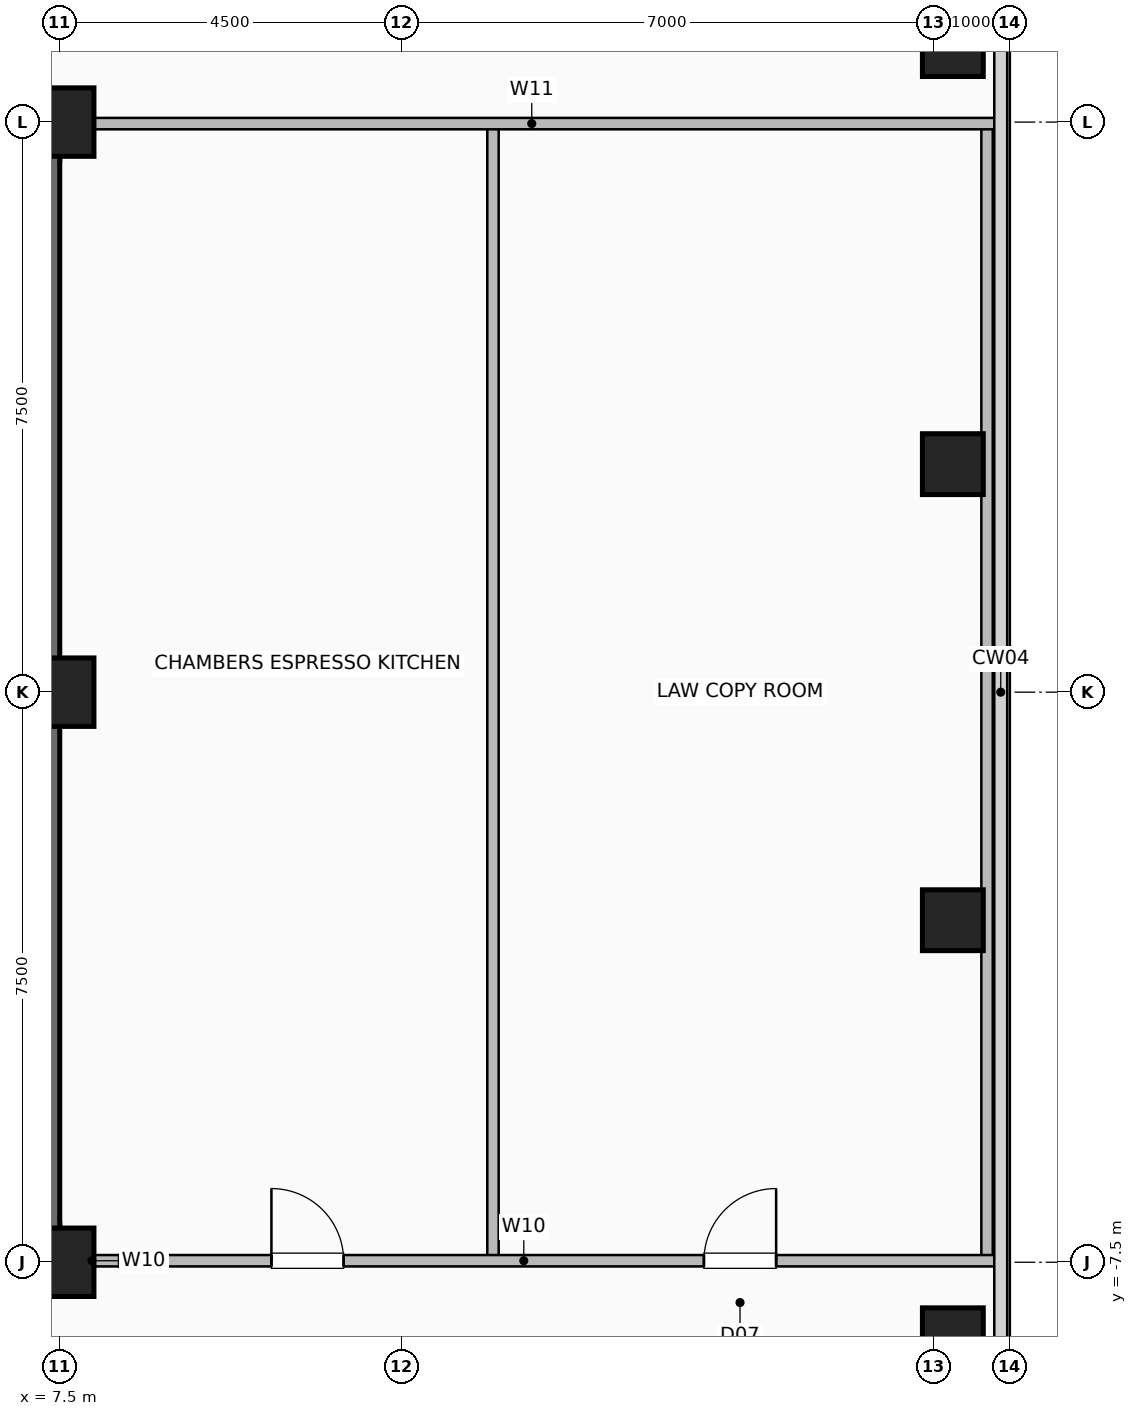
"""IFC4 building model, lengths in metres.
Left out: names, types, materials, properties, quantities, classifications, styles, units other than length and angle.
Written with IfcOpenShell. Run it as: python <this file> out.ifc"""

import sys

from ifc_helpers import new_model, si_unit, direction, frame, frame_2d, origin, origin_2d, place, context, subcontext, project, spatial, rectangle, hollow_rectangle, extrude, element, fill, save


model = new_model("IFC4")
c1 = context("Model", 3, precision=1e-05, world=origin(), true_north=direction((0.0, 1.0)))
c2 = subcontext(c1, "Body", "Model", "MODEL_VIEW")
j1 = project(units=[si_unit("LENGTHUNIT", "METRE"), si_unit("PLANEANGLEUNIT", "RADIAN")], contexts=[c1])
p1 = place(None, origin())
s1 = spatial("IfcSite", under=j1, at=p1, CompositionType="ELEMENT")
p2 = place(p1, origin())
s2 = spatial("IfcBuilding", under=s1, at=p2, CompositionType="ELEMENT")
p3 = place(p2, frame((0.0, 0.0, 177.0)))
s3 = spatial("IfcBuildingStorey", under=s2, at=p3, CompositionType="ELEMENT", Elevation=177.0)
for number, where, z_axis, x_axis in (
    (1, (7.5, -7.5, 0.0), (0.0, 0.0, 1.0), (1.0, 0.0, 0.0)),
    (2, (7.5, 0.0, 0.0), (0.0, 0.0, 1.0), (1.0, 0.0, 0.0)),
    (3, (7.5, 7.5, 0.0), (0.0, 0.0, 1.0), (1.0, 0.0, 0.0)),
):
    element("IfcColumn", number, at=place(p3, frame(where, z_axis=z_axis, x_axis=x_axis)), inside=s3, PredefinedType="COLUMN", context=c2, shape_type="SweptSolid", body=[
        extrude(hollow_rectangle(XDim=0.9, YDim=0.9, WallThickness=0.045, at=origin_2d()), origin(), (0.0, 0.0, 1.0), 3.6),
    ])
for number, where, z_axis, x_axis in (
    (4, (19.25, -8.5, 0.0), (0.0, 0.0, 1.0), (1.0, 0.0, 0.0)),
    (5, (19.25, -3.0, 0.0), (0.0, 0.0, 1.0), (1.0, 0.0, 0.0)),
    (6, (19.25, 3.0, 0.0), (0.0, 0.0, 1.0), (1.0, 0.0, 0.0)),
    (7, (19.25, 8.5, 0.0), (0.0, 0.0, 1.0), (1.0, 0.0, 0.0)),
):
    element("IfcColumn", number, at=place(p3, frame(where, z_axis=z_axis, x_axis=x_axis)), inside=s3, PredefinedType="COLUMN", context=c2, shape_type="SweptSolid", body=[
        extrude(hollow_rectangle(XDim=0.8, YDim=0.8, WallThickness=0.04, at=origin_2d()), origin(), (0.0, 0.0, 1.0), 3.6),
    ])
p4 = place(p3, frame((-7.5, -7.25, 0.0), z_axis=(0.0, 0.0, 1.0), x_axis=(1.0, 0.0, 0.0)))
e8 = element("IfcWall", 8, at=p4, inside=s3, PredefinedType="SHEAR", context=c2, shape_type="SweptSolid", body=[
    extrude(rectangle(XDim=15.0, YDim=0.5, at=frame_2d((7.5, 0.0))), origin(), (0.0, 0.0, 1.0), 3.36),
])
p5 = place(p4, frame((1.55, 0.0, 0.0)))
e9 = element("IfcOpeningElement", 9, at=p5, cuts=e8, PredefinedType="OPENING", context=c2, shape_type="SweptSolid", body=[
    extrude(rectangle(XDim=1.05, YDim=2.08, at=frame_2d((0.525, 1.04))), frame((0.0, 0.26, 0.0), z_axis=(0.0, -1.0, 0.0), x_axis=(1.0, 0.0, 0.0)), (0.0, 0.0, 1.0), 0.52),
])
p6 = place(p4, frame((12.4, 0.0, 0.0)))
e10 = element("IfcOpeningElement", 10, at=p6, cuts=e8, PredefinedType="OPENING", context=c2, shape_type="SweptSolid", body=[
    extrude(rectangle(XDim=1.05, YDim=2.08, at=frame_2d((0.525, 1.04))), frame((0.0, 0.26, 0.0), z_axis=(0.0, -1.0, 0.0), x_axis=(1.0, 0.0, 0.0)), (0.0, 0.0, 1.0), 0.52),
])
p7 = place(p4, frame((4.95, 0.0, 0.0)))
e11 = element("IfcOpeningElement", 11, at=p7, cuts=e8, PredefinedType="OPENING", context=c2, shape_type="SweptSolid", body=[
    extrude(rectangle(XDim=1.0, YDim=2.08, at=frame_2d((0.5, 1.04))), frame((0.0, 0.26, 0.0), z_axis=(0.0, -1.0, 0.0), x_axis=(1.0, 0.0, 0.0)), (0.0, 0.0, 1.0), 0.52),
])
p8 = place(p4, frame((7.05, 0.0, 0.0)))
e12 = element("IfcOpeningElement", 12, at=p8, cuts=e8, PredefinedType="OPENING", context=c2, shape_type="SweptSolid", body=[
    extrude(rectangle(XDim=1.0, YDim=2.08, at=frame_2d((0.5, 1.04))), frame((0.0, 0.26, 0.0), z_axis=(0.0, -1.0, 0.0), x_axis=(1.0, 0.0, 0.0)), (0.0, 0.0, 1.0), 0.52),
])
p9 = place(p4, frame((9.15, 0.0, 0.0)))
e13 = element("IfcOpeningElement", 13, at=p9, cuts=e8, PredefinedType="OPENING", context=c2, shape_type="SweptSolid", body=[
    extrude(rectangle(XDim=1.0, YDim=2.08, at=frame_2d((0.5, 1.04))), frame((0.0, 0.26, 0.0), z_axis=(0.0, -1.0, 0.0), x_axis=(1.0, 0.0, 0.0)), (0.0, 0.0, 1.0), 0.52),
])
for number, where, z_axis, x_axis in (
    (14, (-7.5, 7.25, 0.0), (0.0, 0.0, 1.0), (1.0, 0.0, 0.0)),
    (15, (7.25, -7.5, 0.0), (0.0, 0.0, 1.0), (0.0, 1.0, 0.0)),
):
    element("IfcWall", number, at=place(p3, frame(where, z_axis=z_axis, x_axis=x_axis)), inside=s3, PredefinedType="SHEAR", context=c2, shape_type="SweptSolid", body=[
        extrude(rectangle(XDim=15.0, YDim=0.5, at=frame_2d((7.5, 0.0))), origin(), (0.0, 0.0, 1.0), 3.36),
    ])
p10 = place(p3, frame((7.45, -7.48, 0.0), z_axis=(0.0, 0.0, 1.0), x_axis=(1.0, 0.0, 0.0)))
e16 = element("IfcWall", 16, at=p10, inside=s3, PredefinedType="PARTITIONING", context=c2, shape_type="SweptSolid", body=[
    extrude(rectangle(XDim=0.95, YDim=0.15, at=frame_2d((0.475, 0.0))), origin(), (0.0, 0.0, 1.0), 3.36),
])
for number, where, z_axis, x_axis in (
    (17, (13.2, -7.48, 0.0), (0.0, 0.0, 1.0), (0.0, 1.0, 0.0)),
    (18, (19.7, -7.48, 0.0), (0.0, 0.0, 1.0), (0.0, 1.0, 0.0)),
):
    element("IfcWall", number, at=place(p3, frame(where, z_axis=z_axis, x_axis=x_axis)), inside=s3, PredefinedType="PARTITIONING", context=c2, shape_type="SweptSolid", body=[
        extrude(rectangle(XDim=14.9, YDim=0.15, at=frame_2d((7.45, 0.0))), origin(), (0.0, 0.0, 1.0), 3.36),
    ])
p11 = place(p3, frame((8.28, -7.48, 0.0), z_axis=(0.0, 0.0, 1.0), x_axis=(1.0, 0.0, 0.0)))
e19 = element("IfcWall", 19, at=p11, inside=s3, PredefinedType="PARTITIONING", context=c2, shape_type="SweptSolid", body=[
    extrude(rectangle(XDim=11.54, YDim=0.15, at=frame_2d((5.77, 0.0))), origin(), (0.0, 0.0, 1.0), 3.36),
])
p12 = place(p11, frame((2.005, 0.0, 0.0)))
e20 = element("IfcOpeningElement", 20, at=p12, cuts=e19, PredefinedType="OPENING", context=c2, shape_type="SweptSolid", body=[
    extrude(rectangle(XDim=0.95, YDim=2.06, at=frame_2d((0.475, 1.03))), frame((0.0, 0.085, 0.0), z_axis=(0.0, -1.0, 0.0), x_axis=(1.0, 0.0, 0.0)), (0.0, 0.0, 1.0), 0.17),
])
p13 = place(p11, frame((7.695, 0.0, 0.0)))
e21 = element("IfcOpeningElement", 21, at=p13, cuts=e19, PredefinedType="OPENING", context=c2, shape_type="SweptSolid", body=[
    extrude(rectangle(XDim=0.95, YDim=2.06, at=frame_2d((0.475, 1.03))), frame((0.0, 0.085, 0.0), z_axis=(0.0, -1.0, 0.0), x_axis=(1.0, 0.0, 0.0)), (0.0, 0.0, 1.0), 0.17),
])
p14 = place(p3, frame((7.6, 7.48, 0.0), z_axis=(0.0, 0.0, 1.0), x_axis=(1.0, 0.0, 0.0)))
e22 = element("IfcWall", 22, at=p14, inside=s3, PredefinedType="PARTITIONING", context=c2, shape_type="SweptSolid", body=[
    extrude(rectangle(XDim=12.22, YDim=0.15, at=frame_2d((6.11, 0.0))), origin(), (0.0, 0.0, 1.0), 3.36),
])
p15 = place(p12, origin())
e23 = element("IfcDoor", 23, at=p15, inside=s3, OperationType="SINGLE_SWING_LEFT", PredefinedType="DOOR", context=c2, shape_type="SweptSolid", body=[
    extrude(rectangle(XDim=0.95, YDim=2.06, at=frame_2d((0.475, 1.03))), frame((0.0, 0.025, 0.0), z_axis=(0.0, -1.0, 0.0), x_axis=(1.0, 0.0, 0.0)), (0.0, 0.0, 1.0), 0.05),
])
fill(e20, e23)
p16 = place(p13, origin())
e24 = element("IfcDoor", 24, at=p16, inside=s3, OperationType="SINGLE_SWING_RIGHT", PredefinedType="DOOR", context=c2, shape_type="SweptSolid", body=[
    extrude(rectangle(XDim=0.95, YDim=2.06, at=frame_2d((0.475, 1.03))), frame((0.0, 0.025, 0.0), z_axis=(0.0, -1.0, 0.0), x_axis=(1.0, 0.0, 0.0)), (0.0, 0.0, 1.0), 0.05),
])
fill(e21, e24)
save(model, sys.argv[1])
